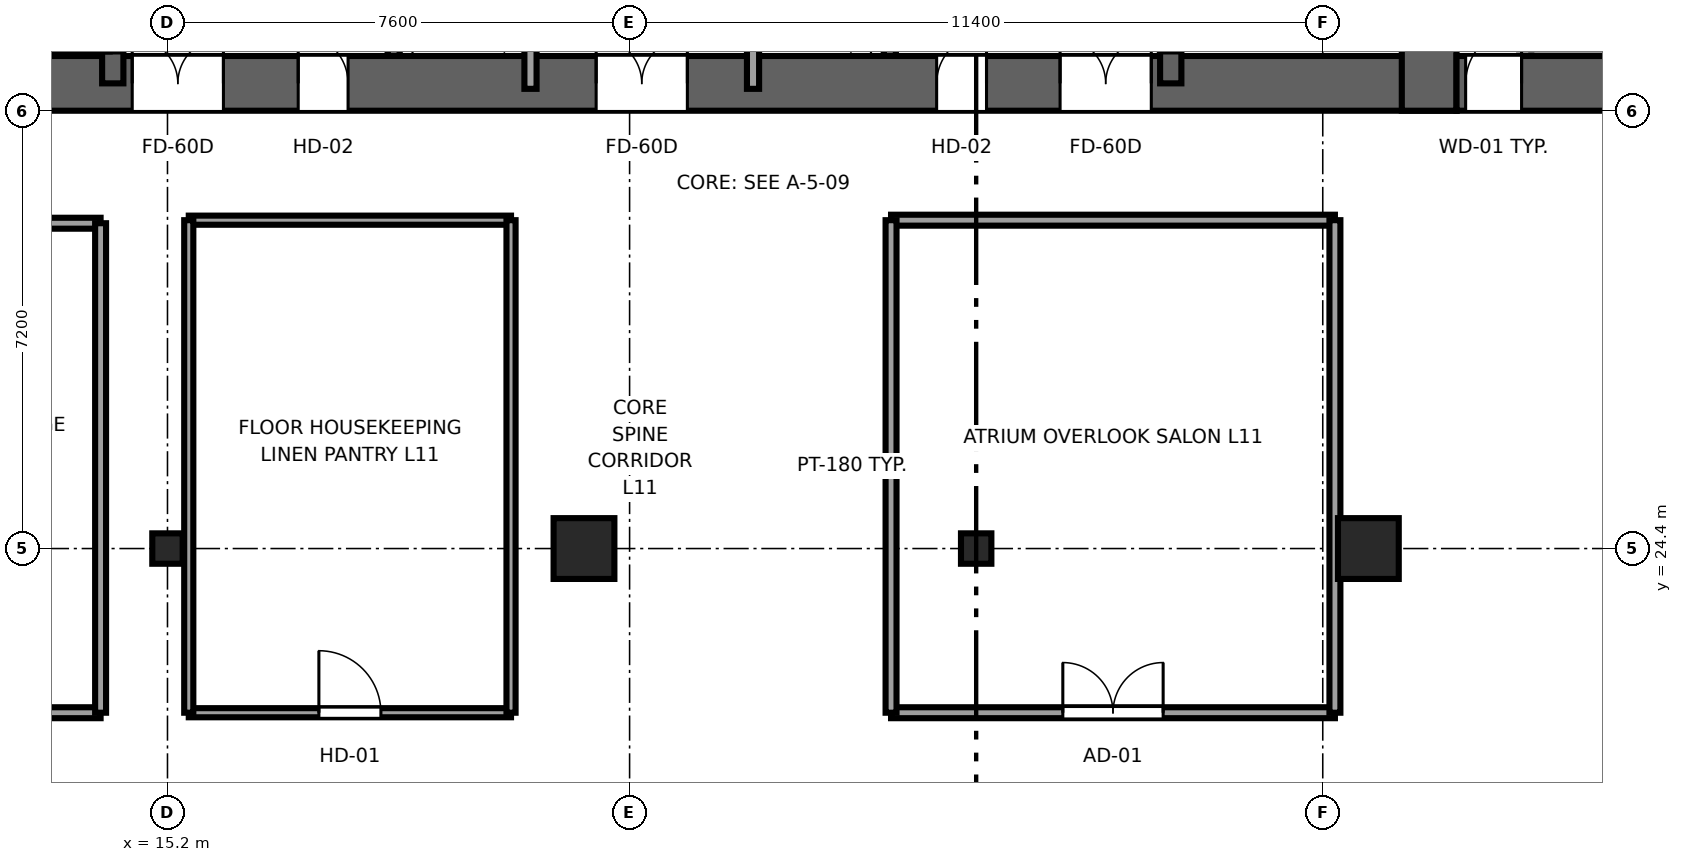
"""IFC4 building model, lengths in metres.
Left out: names, types, materials, properties, quantities, classifications, styles, units other than length and angle.
Written with IfcOpenShell. Run it as: python <this file> out.ifc"""

import sys

from ifc_helpers import new_model, si_unit, direction, frame, frame_2d, origin, origin_2d, place, context, subcontext, project, spatial, rectangle, i_section, extrude, source, transform, mapped, element, fill, save


model = new_model("IFC4")
c1 = context("Model", 3, precision=1e-05, world=origin(), true_north=direction((0.0, 1.0)))
c2 = subcontext(c1, "Body", "Model", "MODEL_VIEW")
j1 = project(units=[si_unit("LENGTHUNIT", "METRE"), si_unit("PLANEANGLEUNIT", "RADIAN")], contexts=[c1])
p1 = place(None, origin())
s1 = spatial("IfcSite", under=j1, at=p1, CompositionType="ELEMENT")
p2 = place(p1, origin())
s2 = spatial("IfcBuilding", under=s1, at=p2, CompositionType="ELEMENT")
p3 = place(p2, frame((0.0, 0.0, 49.75)))
s3 = spatial("IfcBuildingStorey", under=s2, at=p3, CompositionType="ELEMENT", Elevation=49.75)
p4 = place(p3, frame((9.6, 32.05, 0.0), z_axis=(0.0, 0.0, 1.0), x_axis=(1.0, 0.0, 0.0)))
e1 = element("IfcWall", 1, at=p4, inside=s3, PredefinedType="SHEAR", context=c2, shape_type="SweptSolid", body=[
    extrude(rectangle(XDim=26.8, YDim=0.9, at=frame_2d((13.4, 0.0))), origin(), (0.0, 0.0, 1.0), 3.55),
])
p5 = place(p4, frame((6.52, 0.0, 0.0), z_axis=(0.0, 0.0, 1.0), x_axis=(-1.0, 0.0, 0.0)))
e2 = element("IfcOpeningElement", 2, at=p5, cuts=e1, PredefinedType="OPENING", context=c2, shape_type="SweptSolid", body=[
    extrude(rectangle(XDim=1.5, YDim=2.04, at=frame_2d((0.75, 1.02))), frame((0.0, 0.46, 0.0), z_axis=(0.0, -1.0, 0.0), x_axis=(1.0, 0.0, 0.0)), (0.0, 0.0, 1.0), 0.92),
])
p6 = place(p4, frame((14.15, 0.0, 0.0), z_axis=(0.0, 0.0, 1.0), x_axis=(-1.0, 0.0, 0.0)))
e3 = element("IfcOpeningElement", 3, at=p6, cuts=e1, PredefinedType="OPENING", context=c2, shape_type="SweptSolid", body=[
    extrude(rectangle(XDim=1.5, YDim=2.04, at=frame_2d((0.75, 1.02))), frame((0.0, 0.46, 0.0), z_axis=(0.0, -1.0, 0.0), x_axis=(1.0, 0.0, 0.0)), (0.0, 0.0, 1.0), 0.92),
])
p7 = place(p4, frame((21.78, 0.0, 0.0), z_axis=(0.0, 0.0, 1.0), x_axis=(-1.0, 0.0, 0.0)))
e4 = element("IfcOpeningElement", 4, at=p7, cuts=e1, PredefinedType="OPENING", context=c2, shape_type="SweptSolid", body=[
    extrude(rectangle(XDim=1.5, YDim=2.04, at=frame_2d((0.75, 1.02))), frame((0.0, 0.46, 0.0), z_axis=(0.0, -1.0, 0.0), x_axis=(1.0, 0.0, 0.0)), (0.0, 0.0, 1.0), 0.92),
])
p8 = place(p4, frame((8.57, 0.0, 0.0), z_axis=(0.0, 0.0, 1.0), x_axis=(-1.0, 0.0, 0.0)))
e5 = element("IfcOpeningElement", 5, at=p8, cuts=e1, PredefinedType="OPENING", context=c2, shape_type="SweptSolid", body=[
    extrude(rectangle(XDim=0.82, YDim=2.01, at=frame_2d((0.41, 1.005))), frame((0.0, 0.46, 0.0), z_axis=(0.0, -1.0, 0.0), x_axis=(1.0, 0.0, 0.0)), (0.0, 0.0, 1.0), 0.92),
])
p9 = place(p4, frame((19.07, 0.0, 0.0), z_axis=(0.0, 0.0, 1.0), x_axis=(-1.0, 0.0, 0.0)))
e6 = element("IfcOpeningElement", 6, at=p9, cuts=e1, PredefinedType="OPENING", context=c2, shape_type="SweptSolid", body=[
    extrude(rectangle(XDim=0.82, YDim=2.01, at=frame_2d((0.41, 1.005))), frame((0.0, 0.46, 0.0), z_axis=(0.0, -1.0, 0.0), x_axis=(1.0, 0.0, 0.0)), (0.0, 0.0, 1.0), 0.92),
])
p10 = place(p3, frame((35.95, 31.6, 0.0), z_axis=(0.0, 0.0, 1.0), x_axis=(0.0, 1.0, 0.0)))
e7 = element("IfcWall", 7, at=p10, inside=s3, PredefinedType="SHEAR", context=c2, shape_type="SweptSolid", body=[
    extrude(rectangle(XDim=13.6, YDim=0.9, at=frame_2d((6.8, 0.0))), origin(), (0.0, 0.0, 1.0), 3.55),
])
p11 = place(p3, frame((14.3, 32.05, 0.0), z_axis=(0.0, 0.0, 1.0), x_axis=(0.0, 1.0, 0.0)))
e8 = element("IfcWall", 8, at=p11, inside=s3, PredefinedType="SHEAR", context=c2, shape_type="SweptSolid", body=[
    extrude(rectangle(XDim=12.7, YDim=0.35, at=frame_2d((6.35, 0.0))), origin(), (0.0, 0.0, 1.0), 3.55),
])
p12 = place(p11, frame((0.5, 0.0, 0.0)))
e9 = element("IfcOpeningElement", 9, at=p12, cuts=e8, PredefinedType="OPENING", context=c2, shape_type="SweptSolid", body=[
    extrude(rectangle(XDim=1.1, YDim=2.12, at=frame_2d((0.55, 1.06))), frame((0.0, 0.185, 0.0), z_axis=(0.0, -1.0, 0.0), x_axis=(1.0, 0.0, 0.0)), (0.0, 0.0, 1.0), 0.37),
])
p13 = place(p3, frame((31.7, 32.05, 0.0), z_axis=(0.0, 0.0, 1.0), x_axis=(0.0, 1.0, 0.0)))
e10 = element("IfcWall", 10, at=p13, inside=s3, PredefinedType="SHEAR", context=c2, shape_type="SweptSolid", body=[
    extrude(rectangle(XDim=12.7, YDim=0.35, at=frame_2d((6.35, 0.0))), origin(), (0.0, 0.0, 1.0), 3.55),
])
p14 = place(p13, frame((1.6, 0.0, 0.0), z_axis=(0.0, 0.0, 1.0), x_axis=(-1.0, 0.0, 0.0)))
e11 = element("IfcOpeningElement", 11, at=p14, cuts=e10, PredefinedType="OPENING", context=c2, shape_type="SweptSolid", body=[
    extrude(rectangle(XDim=1.1, YDim=2.12, at=frame_2d((0.55, 1.06))), frame((0.0, 0.185, 0.0), z_axis=(0.0, -1.0, 0.0), x_axis=(1.0, 0.0, 0.0)), (0.0, 0.0, 1.0), 0.37),
])
p15 = place(p3, frame((36.4, 32.05, 0.0), z_axis=(0.0, 0.0, 1.0), x_axis=(1.0, 0.0, 0.0)))
e12 = element("IfcWall", 12, at=p15, inside=s3, PredefinedType="SHEAR", context=c2, shape_type="SweptSolid", body=[
    extrude(rectangle(XDim=4.0, YDim=0.9, at=frame_2d((2.0, 0.0))), origin(), (0.0, 0.0, 1.0), 3.55),
])
p16 = place(p15, frame((1.07, 0.0, 0.0), z_axis=(0.0, 0.0, 1.0), x_axis=(-1.0, 0.0, 0.0)))
e13 = element("IfcOpeningElement", 13, at=p16, cuts=e12, PredefinedType="OPENING", context=c2, shape_type="SweptSolid", body=[
    extrude(rectangle(XDim=0.92, YDim=2.01, at=frame_2d((0.46, 1.005))), frame((0.0, 0.46, 0.0), z_axis=(0.0, -1.0, 0.0), x_axis=(1.0, 0.0, 0.0)), (0.0, 0.0, 1.0), 0.92),
])
m1 = source(origin(), c2, "Body", "SweptSolid", [
    extrude(i_section(OverallWidth=0.5, OverallDepth=0.5, WebThickness=0.028, FlangeThickness=0.045, at=origin_2d()), origin(), (0.0, 0.0, 1.0), 3.55),
])
p17 = place(p3, frame((15.2, 24.4, 0.0), z_axis=(0.0, 0.0, 1.0), x_axis=(1.0, 0.0, 0.0)))
e14 = element("IfcColumn", 14, at=p17, inside=s3, PredefinedType="COLUMN", context=c2, shape_type="MappedRepresentation", body=[
    mapped(m1, transform((0.0, 0.0, 0.0), x_axis=(1.0, 0.0, 0.0), y_axis=(0.0, 1.0, 0.0), z_axis=(0.0, 0.0, 1.0), scale=1.0)),
])
m2 = source(origin(), c2, "Body", "SweptSolid", [
    extrude(rectangle(XDim=1.0, YDim=1.0, at=origin_2d()), origin(), (0.0, 0.0, 1.0), 3.55),
])
for number, where, z_axis, x_axis in (
    (15, (22.05, 24.4, 0.0), (0.0, 0.0, 1.0), (1.0, 0.0, 0.0)),
    (16, (34.95, 24.4, 0.0), (0.0, 0.0, 1.0), (1.0, 0.0, 0.0)),
):
    element("IfcColumn", number, at=place(p3, frame(where, z_axis=z_axis, x_axis=x_axis)), inside=s3, PredefinedType="COLUMN", context=c2, shape_type="MappedRepresentation", body=[
        mapped(m2, transform((0.0, 0.0, 0.0), x_axis=(1.0, 0.0, 0.0), y_axis=(0.0, 1.0, 0.0), z_axis=(0.0, 0.0, 1.0), scale=1.0)),
    ])
p18 = place(p3, frame((28.5, 24.4, 0.0), z_axis=(0.0, 0.0, 1.0), x_axis=(1.0, 0.0, 0.0)))
e17 = element("IfcColumn", 17, at=p18, inside=s3, PredefinedType="COLUMN", context=c2, shape_type="MappedRepresentation", body=[
    mapped(m1, transform((0.0, 0.0, 0.0), x_axis=(1.0, 0.0, 0.0), y_axis=(0.0, 1.0, 0.0), z_axis=(0.0, 0.0, 1.0), scale=1.0)),
])
for number, where, z_axis, x_axis in (
    (18, (18.92, 32.504, 0.0), (0.0, 0.0, 1.0), (0.0, 1.0, 0.0)),
    (19, (27.08, 32.504, 0.0), (0.0, 0.0, 1.0), (0.0, 1.0, 0.0)),
):
    element("IfcWall", number, at=place(p3, frame(where, z_axis=z_axis, x_axis=x_axis)), inside=s3, PredefinedType="SOLIDWALL", context=c2, shape_type="SweptSolid", body=[
        extrude(rectangle(XDim=3.646, YDim=0.2, at=frame_2d((1.823, 0.0))), origin(), (0.0, 0.0, 1.0), 3.37),
    ])
for number, where, z_axis, x_axis in (
    (20, (21.17, 31.96, 0.0), (0.0, 0.0, 1.0), (0.0, 1.0, 0.0)),
    (21, (24.83, 31.96, 0.0), (0.0, 0.0, 1.0), (0.0, 1.0, 0.0)),
):
    element("IfcWall", number, at=place(p3, frame(where, z_axis=z_axis, x_axis=x_axis)), inside=s3, PredefinedType="SOLIDWALL", context=c2, shape_type="SweptSolid", body=[
        extrude(rectangle(XDim=12.58, YDim=0.2, at=frame_2d((6.29, 0.0))), origin(), (0.0, 0.0, 1.0), 3.37),
    ])
p19 = place(p3, frame((9.88, 21.7, 0.0), z_axis=(0.0, 0.0, 1.0), x_axis=(1.0, 0.0, 0.0)))
e22 = element("IfcWall", 22, at=p19, inside=s3, PredefinedType="PARTITIONING", context=c2, shape_type="SweptSolid", body=[
    extrude(rectangle(XDim=4.22, YDim=0.18, at=frame_2d((2.11, 0.0))), origin(), (0.0, 0.0, 1.0), 3.37),
])
p20 = place(p19, frame((1.285, 0.0, 0.0)))
e23 = element("IfcOpeningElement", 23, at=p20, cuts=e22, PredefinedType="OPENING", context=c2, shape_type="SweptSolid", body=[
    extrude(rectangle(XDim=1.65, YDim=2.15, at=frame_2d((0.825, 1.075))), frame((0.0, 0.1, 0.0), z_axis=(0.0, -1.0, 0.0), x_axis=(1.0, 0.0, 0.0)), (0.0, 0.0, 1.0), 0.2),
])
p21 = place(p3, frame((9.88, 29.75, 0.0), z_axis=(0.0, 0.0, 1.0), x_axis=(1.0, 0.0, 0.0)))
e24 = element("IfcWall", 24, at=p21, inside=s3, PredefinedType="PARTITIONING", context=c2, shape_type="SweptSolid", body=[
    extrude(rectangle(XDim=4.22, YDim=0.18, at=frame_2d((2.11, 0.0))), origin(), (0.0, 0.0, 1.0), 3.37),
])
p22 = place(p3, frame((14.1, 21.7, 0.0), z_axis=(0.0, 0.0, 1.0), x_axis=(0.0, 1.0, 0.0)))
e25 = element("IfcWall", 25, at=p22, inside=s3, PredefinedType="PARTITIONING", context=c2, shape_type="SweptSolid", body=[
    extrude(rectangle(XDim=8.05, YDim=0.18, at=frame_2d((4.025, 0.0))), origin(), (0.0, 0.0, 1.0), 3.37),
])
p23 = place(p3, frame((27.1, 21.7, 0.0), z_axis=(0.0, 0.0, 1.0), x_axis=(1.0, 0.0, 0.0)))
e26 = element("IfcWall", 26, at=p23, inside=s3, PredefinedType="PARTITIONING", context=c2, shape_type="SweptSolid", body=[
    extrude(rectangle(XDim=7.3, YDim=0.18, at=frame_2d((3.65, 0.0))), origin(), (0.0, 0.0, 1.0), 3.37),
])
p24 = place(p23, frame((2.825, 0.0, 0.0)))
e27 = element("IfcOpeningElement", 27, at=p24, cuts=e26, PredefinedType="OPENING", context=c2, shape_type="SweptSolid", body=[
    extrude(rectangle(XDim=1.65, YDim=2.15, at=frame_2d((0.825, 1.075))), frame((0.0, 0.1, 0.0), z_axis=(0.0, -1.0, 0.0), x_axis=(1.0, 0.0, 0.0)), (0.0, 0.0, 1.0), 0.2),
])
p25 = place(p3, frame((27.1, 29.8, 0.0), z_axis=(0.0, 0.0, 1.0), x_axis=(1.0, 0.0, 0.0)))
e28 = element("IfcWall", 28, at=p25, inside=s3, PredefinedType="PARTITIONING", context=c2, shape_type="SweptSolid", body=[
    extrude(rectangle(XDim=7.3, YDim=0.18, at=frame_2d((3.65, 0.0))), origin(), (0.0, 0.0, 1.0), 3.37),
])
for number, where, z_axis, x_axis in (
    (29, (27.1, 21.7, 0.0), (0.0, 0.0, 1.0), (0.0, 1.0, 0.0)),
    (30, (34.4, 21.7, 0.0), (0.0, 0.0, 1.0), (0.0, 1.0, 0.0)),
):
    element("IfcWall", number, at=place(p3, frame(where, z_axis=z_axis, x_axis=x_axis)), inside=s3, PredefinedType="PARTITIONING", context=c2, shape_type="SweptSolid", body=[
        extrude(rectangle(XDim=8.1, YDim=0.18, at=frame_2d((4.05, 0.0))), origin(), (0.0, 0.0, 1.0), 3.37),
    ])
p26 = place(p3, frame((15.55, 21.7, 0.0), z_axis=(0.0, 0.0, 1.0), x_axis=(1.0, 0.0, 0.0)))
e31 = element("IfcWall", 31, at=p26, inside=s3, PredefinedType="PARTITIONING", context=c2, shape_type="SweptSolid", body=[
    extrude(rectangle(XDim=5.3, YDim=0.15, at=frame_2d((2.65, 0.0))), origin(), (0.0, 0.0, 1.0), 3.37),
])
p27 = place(p26, frame((2.14, 0.0, 0.0)))
e32 = element("IfcOpeningElement", 32, at=p27, cuts=e31, PredefinedType="OPENING", context=c2, shape_type="SweptSolid", body=[
    extrude(rectangle(XDim=1.02, YDim=2.03, at=frame_2d((0.51, 1.015))), frame((0.0, 0.085, 0.0), z_axis=(0.0, -1.0, 0.0), x_axis=(1.0, 0.0, 0.0)), (0.0, 0.0, 1.0), 0.17),
])
p28 = place(p3, frame((15.55, 29.8, 0.0), z_axis=(0.0, 0.0, 1.0), x_axis=(1.0, 0.0, 0.0)))
e33 = element("IfcWall", 33, at=p28, inside=s3, PredefinedType="PARTITIONING", context=c2, shape_type="SweptSolid", body=[
    extrude(rectangle(XDim=5.3, YDim=0.15, at=frame_2d((2.65, 0.0))), origin(), (0.0, 0.0, 1.0), 3.37),
])
for number, where, z_axis, x_axis in (
    (34, (15.55, 21.7, 0.0), (0.0, 0.0, 1.0), (0.0, 1.0, 0.0)),
    (35, (20.85, 21.7, 0.0), (0.0, 0.0, 1.0), (0.0, 1.0, 0.0)),
):
    element("IfcWall", number, at=place(p3, frame(where, z_axis=z_axis, x_axis=x_axis)), inside=s3, PredefinedType="PARTITIONING", context=c2, shape_type="SweptSolid", body=[
        extrude(rectangle(XDim=8.1, YDim=0.15, at=frame_2d((4.05, 0.0))), origin(), (0.0, 0.0, 1.0), 3.37),
    ])
m3 = source(origin(), c2, "Body", "SweptSolid", [
    extrude(rectangle(XDim=1.1, YDim=2.12, at=frame_2d((0.55, 1.06))), frame((0.0, 0.025, 0.0), z_axis=(0.0, -1.0, 0.0), x_axis=(1.0, 0.0, 0.0)), (0.0, 0.0, 1.0), 0.05),
])
p29 = place(p12, origin())
e36 = element("IfcDoor", 36, at=p29, inside=s3, OperationType="SINGLE_SWING_LEFT", PredefinedType="DOOR", context=c2, shape_type="MappedRepresentation", body=[
    mapped(m3, transform((0.0, 0.0, 0.0), x_axis=(1.0, 0.0, 0.0), y_axis=(0.0, 1.0, 0.0), z_axis=(0.0, 0.0, 1.0), scale=1.0)),
])
fill(e9, e36)
p30 = place(p14, origin())
e37 = element("IfcDoor", 37, at=p30, inside=s3, OperationType="SINGLE_SWING_RIGHT", PredefinedType="DOOR", context=c2, shape_type="MappedRepresentation", body=[
    mapped(m3, transform((0.0, 0.0, 0.0), x_axis=(1.0, 0.0, 0.0), y_axis=(0.0, 1.0, 0.0), z_axis=(0.0, 0.0, 1.0), scale=1.0)),
])
fill(e11, e37)
m4 = source(origin(), c2, "Body", "SweptSolid", [
    extrude(rectangle(XDim=1.5, YDim=2.04, at=frame_2d((0.75, 1.02))), frame((0.0, 0.025, 0.0), z_axis=(0.0, -1.0, 0.0), x_axis=(1.0, 0.0, 0.0)), (0.0, 0.0, 1.0), 0.05),
])
p31 = place(p5, origin())
e38 = element("IfcDoor", 38, at=p31, inside=s3, OperationType="DOUBLE_DOOR_SINGLE_SWING", PredefinedType="DOOR", context=c2, shape_type="MappedRepresentation", body=[
    mapped(m4, transform((0.0, 0.0, 0.0), x_axis=(1.0, 0.0, 0.0), y_axis=(0.0, 1.0, 0.0), z_axis=(0.0, 0.0, 1.0), scale=1.0)),
])
fill(e2, e38)
p32 = place(p6, origin())
e39 = element("IfcDoor", 39, at=p32, inside=s3, OperationType="DOUBLE_DOOR_SINGLE_SWING", PredefinedType="DOOR", context=c2, shape_type="MappedRepresentation", body=[
    mapped(m4, transform((0.0, 0.0, 0.0), x_axis=(1.0, 0.0, 0.0), y_axis=(0.0, 1.0, 0.0), z_axis=(0.0, 0.0, 1.0), scale=1.0)),
])
fill(e3, e39)
p33 = place(p7, origin())
e40 = element("IfcDoor", 40, at=p33, inside=s3, OperationType="DOUBLE_DOOR_SINGLE_SWING", PredefinedType="DOOR", context=c2, shape_type="MappedRepresentation", body=[
    mapped(m4, transform((0.0, 0.0, 0.0), x_axis=(1.0, 0.0, 0.0), y_axis=(0.0, 1.0, 0.0), z_axis=(0.0, 0.0, 1.0), scale=1.0)),
])
fill(e4, e40)
m5 = source(origin(), c2, "Body", "SweptSolid", [
    extrude(rectangle(XDim=0.82, YDim=2.01, at=frame_2d((0.41, 1.005))), frame((0.0, 0.025, 0.0), z_axis=(0.0, -1.0, 0.0), x_axis=(1.0, 0.0, 0.0)), (0.0, 0.0, 1.0), 0.05),
])
p34 = place(p8, origin())
e41 = element("IfcDoor", 41, at=p34, inside=s3, OperationType="SINGLE_SWING_LEFT", PredefinedType="DOOR", context=c2, shape_type="MappedRepresentation", body=[
    mapped(m5, transform((0.0, 0.0, 0.0), x_axis=(1.0, 0.0, 0.0), y_axis=(0.0, 1.0, 0.0), z_axis=(0.0, 0.0, 1.0), scale=1.0)),
])
fill(e5, e41)
p35 = place(p9, origin())
e42 = element("IfcDoor", 42, at=p35, inside=s3, OperationType="SINGLE_SWING_RIGHT", PredefinedType="DOOR", context=c2, shape_type="MappedRepresentation", body=[
    mapped(m5, transform((0.0, 0.0, 0.0), x_axis=(1.0, 0.0, 0.0), y_axis=(0.0, 1.0, 0.0), z_axis=(0.0, 0.0, 1.0), scale=1.0)),
])
fill(e6, e42)
m6 = source(origin(), c2, "Body", "SweptSolid", [
    extrude(rectangle(XDim=0.92, YDim=2.01, at=frame_2d((0.46, 1.005))), frame((0.0, 0.025, 0.0), z_axis=(0.0, -1.0, 0.0), x_axis=(1.0, 0.0, 0.0)), (0.0, 0.0, 1.0), 0.05),
])
p36 = place(p16, origin())
e43 = element("IfcDoor", 43, at=p36, inside=s3, OperationType="SINGLE_SWING_RIGHT", PredefinedType="DOOR", context=c2, shape_type="MappedRepresentation", body=[
    mapped(m6, transform((0.0, 0.0, 0.0), x_axis=(1.0, 0.0, 0.0), y_axis=(0.0, 1.0, 0.0), z_axis=(0.0, 0.0, 1.0), scale=1.0)),
])
fill(e13, e43)
m7 = source(origin(), c2, "Body", "SweptSolid", [
    extrude(rectangle(XDim=1.65, YDim=2.15, at=frame_2d((0.825, 1.075))), frame((0.0, 0.025, 0.0), z_axis=(0.0, -1.0, 0.0), x_axis=(1.0, 0.0, 0.0)), (0.0, 0.0, 1.0), 0.05),
])
p37 = place(p24, origin())
e44 = element("IfcDoor", 44, at=p37, inside=s3, OperationType="DOUBLE_DOOR_SINGLE_SWING", PredefinedType="DOOR", context=c2, shape_type="MappedRepresentation", body=[
    mapped(m7, transform((0.0, 0.0, 0.0), x_axis=(1.0, 0.0, 0.0), y_axis=(0.0, 1.0, 0.0), z_axis=(0.0, 0.0, 1.0), scale=1.0)),
])
fill(e27, e44)
m8 = source(origin(), c2, "Body", "SweptSolid", [
    extrude(rectangle(XDim=1.02, YDim=2.03, at=frame_2d((0.51, 1.015))), frame((0.0, 0.025, 0.0), z_axis=(0.0, -1.0, 0.0), x_axis=(1.0, 0.0, 0.0)), (0.0, 0.0, 1.0), 0.05),
])
p38 = place(p27, origin())
e45 = element("IfcDoor", 45, at=p38, inside=s3, OperationType="SINGLE_SWING_LEFT", PredefinedType="DOOR", context=c2, shape_type="MappedRepresentation", body=[
    mapped(m8, transform((0.0, 0.0, 0.0), x_axis=(1.0, 0.0, 0.0), y_axis=(0.0, 1.0, 0.0), z_axis=(0.0, 0.0, 1.0), scale=1.0)),
])
fill(e32, e45)
save(model, sys.argv[1])
